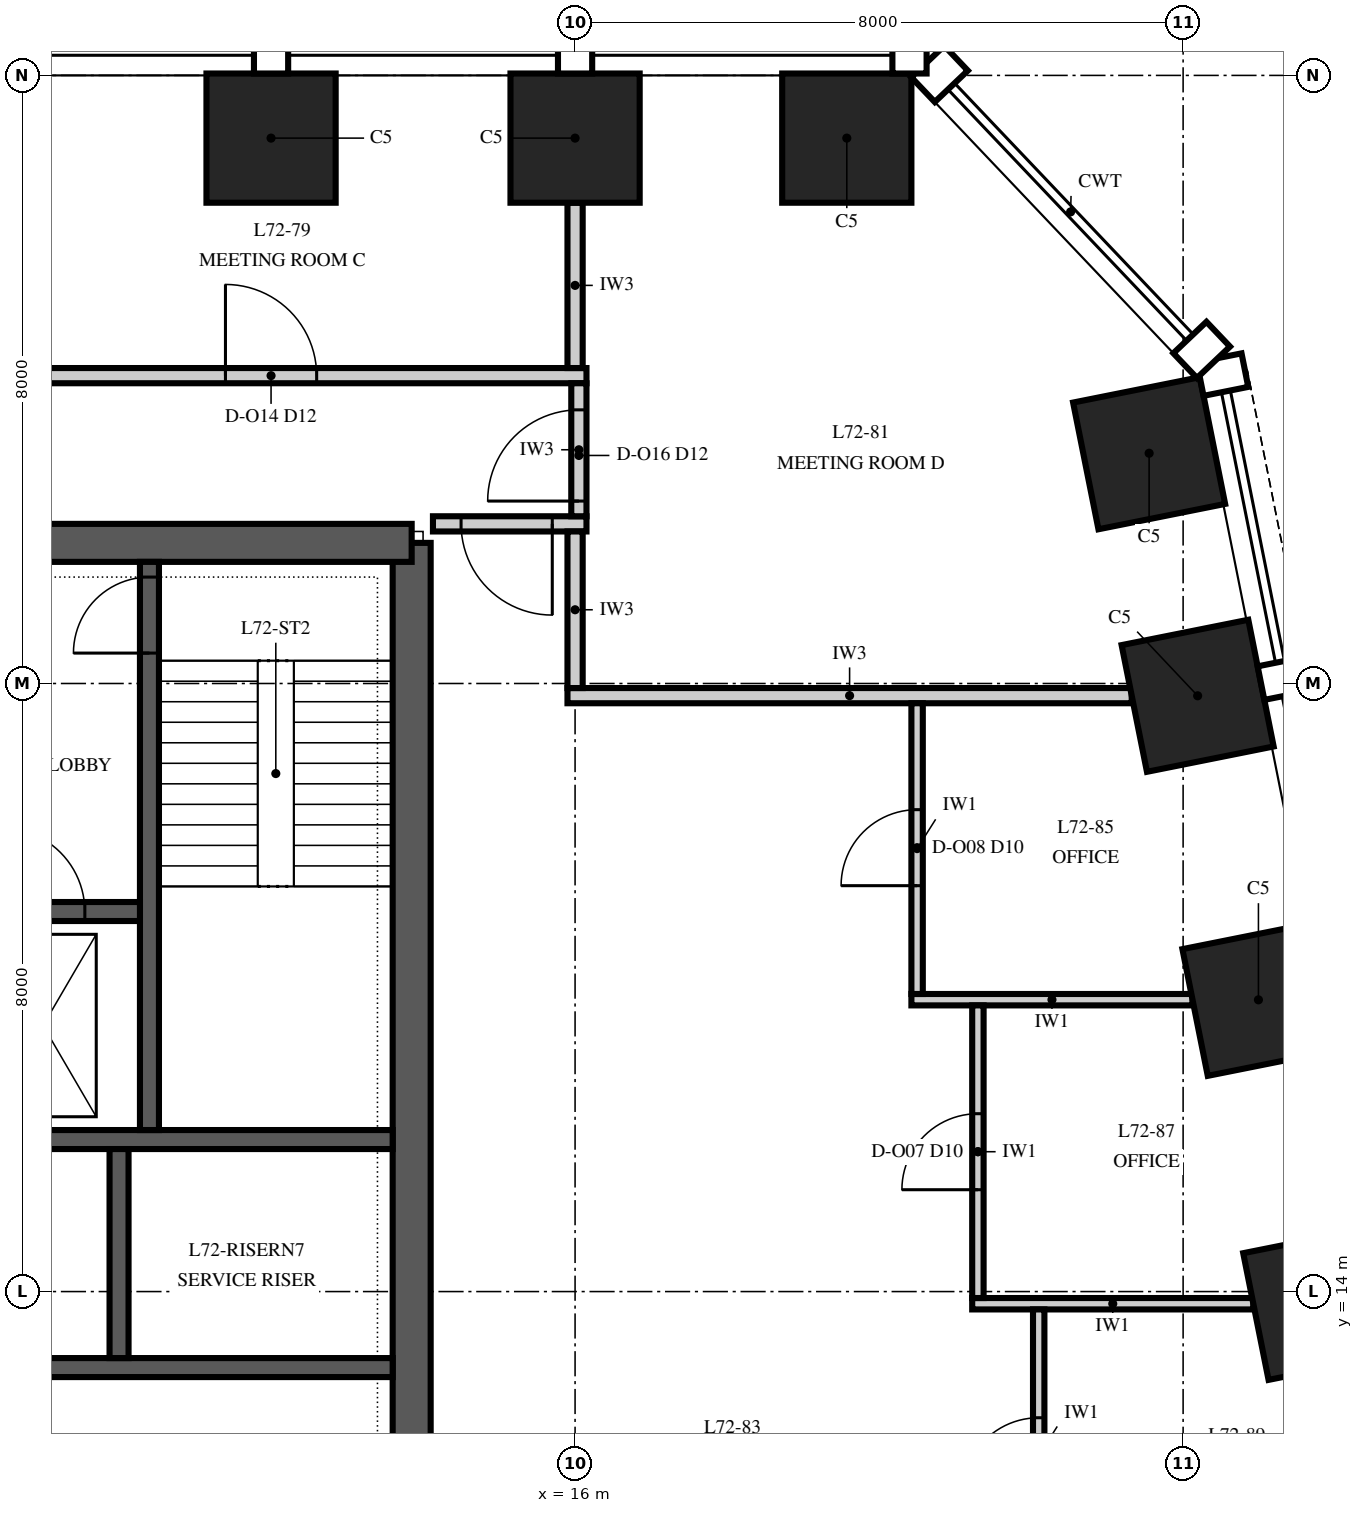
"""IFC4 building model, lengths in metres.
Left out: names, types, materials, properties, quantities, classifications, styles, units other than length and angle.
Written with IfcOpenShell. Run it as: python <this file> out.ifc"""

import sys

from ifc_helpers import new_model, si_unit, direction, frame, frame_2d, origin, origin_2d, place, context, subcontext, project, spatial, polyline, rectangle, outline, extrude, element, fill, save


model = new_model("IFC4")
c1 = context("Model", 3, precision=1e-05, world=origin(), true_north=direction((0.0, 1.0)))
c2 = subcontext(c1, "Body", "Model", "MODEL_VIEW")
j1 = project(units=[si_unit("LENGTHUNIT", "METRE"), si_unit("PLANEANGLEUNIT", "RADIAN")], contexts=[c1])
p1 = place(None, origin())
s1 = spatial("IfcSite", under=j1, at=p1, CompositionType="ELEMENT")
p2 = place(p1, origin())
s2 = spatial("IfcBuilding", under=s1, at=p2, CompositionType="ELEMENT")
p3 = place(p2, frame((0.0, 0.0, 308.0)))
s3 = spatial("IfcBuildingStorey", under=s2, at=p3, CompositionType="ELEMENT", Elevation=308.0)
for number, where, z_axis, x_axis in (
    (1, (25.791, 13.838, 0.0), (0.0, 0.0, 1.0), (-0.196, 0.981, 0.0)),
    (2, (24.991, 17.838, 0.0), (0.0, 0.0, 1.0), (-0.196, 0.981, 0.0)),
    (3, (24.191, 21.838, 0.0), (0.0, 0.0, 1.0), (-0.196, 0.981, 0.0)),
    (4, (23.553, 25.029, 0.0), (0.0, 0.0, 1.0), (-0.196, 0.981, 0.0)),
    (5, (19.575, 29.175, 0.0), (0.0, 0.0, 1.0), (-1.0, 0.0, 0.0)),
    (6, (16.0, 29.175, 0.0), (0.0, 0.0, 1.0), (-1.0, 0.0, 0.0)),
    (7, (12.0, 29.175, 0.0), (0.0, 0.0, 1.0), (-1.0, 0.0, 0.0)),
):
    element("IfcColumn", number, at=place(p3, frame(where, z_axis=z_axis, x_axis=x_axis)), inside=s3, PredefinedType="COLUMN", context=c2, shape_type="SweptSolid", body=[
        extrude(rectangle(XDim=1.7, YDim=1.7, at=origin_2d()), origin(), (0.0, 0.0, 1.0), 4.0),
    ])
p4 = place(p3, frame((13.85, 6.15, 0.0), z_axis=(0.0, 0.0, 1.0), x_axis=(0.0, 1.0, 0.0)))
e8 = element("IfcWall", 8, at=p4, inside=s3, PredefinedType="SHEAR", context=c2, shape_type="SweptSolid", body=[
    extrude(outline(polyline([(0.0, -0.25), (17.7, -0.25), (17.7, 0.0), (17.45, 0.0), (17.45, 0.25), (0.25, 0.25), (0.25, 0.0), (0.0, 0.0), (0.0, -0.25)])), origin(), (0.0, 0.0, 1.0), 4.0),
])
p5 = place(p4, frame((4.15, 0.0, 0.0)))
e9 = element("IfcOpeningElement", 9, at=p5, cuts=e8, PredefinedType="OPENING", context=c2, shape_type="SweptSolid", body=[
    extrude(rectangle(XDim=1.8, YDim=2.4, at=frame_2d((0.9, 1.2))), frame((0.0, 0.265, 0.0), z_axis=(0.0, -1.0, 0.0), x_axis=(1.0, 0.0, 0.0)), (0.0, 0.0, 1.0), 0.53),
])
p6 = place(p3, frame((13.85, 23.85, 0.0), z_axis=(0.0, 0.0, 1.0), x_axis=(-1.0, 0.0, 0.0)))
e10 = element("IfcWall", 10, at=p6, inside=s3, PredefinedType="SHEAR", context=c2, shape_type="SweptSolid", body=[
    extrude(rectangle(XDim=27.7, YDim=0.5, at=frame_2d((13.85, 0.0))), origin(), (0.0, 0.0, 1.0), 4.0),
])
p7 = place(p6, frame((21.75, 0.0, 0.0)))
e11 = element("IfcOpeningElement", 11, at=p7, cuts=e10, PredefinedType="OPENING", context=c2, shape_type="SweptSolid", body=[
    extrude(rectangle(XDim=1.0, YDim=2.1, at=frame_2d((0.5, 1.05))), frame((0.0, 0.265, 0.0), z_axis=(0.0, -1.0, 0.0), x_axis=(1.0, 0.0, 0.0)), (0.0, 0.0, 1.0), 0.53),
])
p8 = place(p6, frame((4.95, 0.0, 0.0)))
e12 = element("IfcOpeningElement", 12, at=p8, cuts=e10, PredefinedType="OPENING", context=c2, shape_type="SweptSolid", body=[
    extrude(rectangle(XDim=1.0, YDim=2.1, at=frame_2d((0.5, 1.05))), frame((0.0, 0.265, 0.0), z_axis=(0.0, -1.0, 0.0), x_axis=(1.0, 0.0, 0.0)), (0.0, 0.0, 1.0), 0.53),
])
p9 = place(p6, frame((17.35, 0.0, 0.0)))
e13 = element("IfcOpeningElement", 13, at=p9, cuts=e10, PredefinedType="OPENING", context=c2, shape_type="SweptSolid", body=[
    extrude(rectangle(XDim=1.0, YDim=2.1, at=frame_2d((0.5, 1.05))), frame((0.0, 0.265, 0.0), z_axis=(0.0, -1.0, 0.0), x_axis=(1.0, 0.0, 0.0)), (0.0, 0.0, 1.0), 0.53),
])
p10 = place(p6, frame((13.35, 0.0, 0.0)))
e14 = element("IfcOpeningElement", 14, at=p10, cuts=e10, PredefinedType="OPENING", context=c2, shape_type="SweptSolid", body=[
    extrude(rectangle(XDim=1.0, YDim=2.1, at=frame_2d((0.5, 1.05))), frame((0.0, 0.265, 0.0), z_axis=(0.0, -1.0, 0.0), x_axis=(1.0, 0.0, 0.0)), (0.0, 0.0, 1.0), 0.53),
])
p11 = place(p6, frame((9.35, 0.0, 0.0)))
e15 = element("IfcOpeningElement", 15, at=p11, cuts=e10, PredefinedType="OPENING", context=c2, shape_type="SweptSolid", body=[
    extrude(rectangle(XDim=1.0, YDim=2.1, at=frame_2d((0.5, 1.05))), frame((0.0, 0.265, 0.0), z_axis=(0.0, -1.0, 0.0), x_axis=(1.0, 0.0, 0.0)), (0.0, 0.0, 1.0), 0.53),
])
p12 = place(p3, frame((-13.6, 13.0, 0.0), z_axis=(0.0, 0.0, 1.0), x_axis=(1.0, 0.0, 0.0)))
e16 = element("IfcWall", 16, at=p12, inside=s3, PredefinedType="SHEAR", context=c2, shape_type="SweptSolid", body=[
    extrude(rectangle(XDim=27.2, YDim=0.25, at=frame_2d((13.6, 0.0))), origin(), (0.0, 0.0, 1.0), 4.0),
])
p13 = place(p12, frame((15.15, 0.0, 0.0)))
e17 = element("IfcOpeningElement", 17, at=p13, cuts=e16, PredefinedType="OPENING", context=c2, shape_type="SweptSolid", body=[
    extrude(rectangle(XDim=0.9, YDim=2.1, at=frame_2d((0.45, 1.05))), frame((0.0, 0.14, 0.0), z_axis=(0.0, -1.0, 0.0), x_axis=(1.0, 0.0, 0.0)), (0.0, 0.0, 1.0), 0.28),
])
p14 = place(p12, frame((17.55, 0.0, 0.0)))
e18 = element("IfcOpeningElement", 18, at=p14, cuts=e16, PredefinedType="OPENING", context=c2, shape_type="SweptSolid", body=[
    extrude(rectangle(XDim=0.9, YDim=2.1, at=frame_2d((0.45, 1.05))), frame((0.0, 0.14, 0.0), z_axis=(0.0, -1.0, 0.0), x_axis=(1.0, 0.0, 0.0)), (0.0, 0.0, 1.0), 0.28),
])
p15 = place(p12, frame((21.15, 0.0, 0.0)))
e19 = element("IfcOpeningElement", 19, at=p15, cuts=e16, PredefinedType="OPENING", context=c2, shape_type="SweptSolid", body=[
    extrude(rectangle(XDim=0.9, YDim=2.1, at=frame_2d((0.45, 1.05))), frame((0.0, 0.14, 0.0), z_axis=(0.0, -1.0, 0.0), x_axis=(1.0, 0.0, 0.0)), (0.0, 0.0, 1.0), 0.28),
])
p16 = place(p12, frame((0.55, 0.0, 0.0)))
e20 = element("IfcOpeningElement", 20, at=p16, cuts=e16, PredefinedType="OPENING", context=c2, shape_type="SweptSolid", body=[
    extrude(rectangle(XDim=0.9, YDim=2.1, at=frame_2d((0.45, 1.05))), frame((0.0, 0.14, 0.0), z_axis=(0.0, -1.0, 0.0), x_axis=(1.0, 0.0, 0.0)), (0.0, 0.0, 1.0), 0.28),
])
p17 = place(p12, frame((3.35, 0.0, 0.0)))
e21 = element("IfcOpeningElement", 21, at=p17, cuts=e16, PredefinedType="OPENING", context=c2, shape_type="SweptSolid", body=[
    extrude(rectangle(XDim=0.9, YDim=2.1, at=frame_2d((0.45, 1.05))), frame((0.0, 0.14, 0.0), z_axis=(0.0, -1.0, 0.0), x_axis=(1.0, 0.0, 0.0)), (0.0, 0.0, 1.0), 0.28),
])
p18 = place(p12, frame((6.15, 0.0, 0.0)))
e22 = element("IfcOpeningElement", 22, at=p18, cuts=e16, PredefinedType="OPENING", context=c2, shape_type="SweptSolid", body=[
    extrude(rectangle(XDim=0.9, YDim=2.1, at=frame_2d((0.45, 1.05))), frame((0.0, 0.14, 0.0), z_axis=(0.0, -1.0, 0.0), x_axis=(1.0, 0.0, 0.0)), (0.0, 0.0, 1.0), 0.28),
])
p19 = place(p3, frame((-13.6, 16.0, 0.0), z_axis=(0.0, 0.0, 1.0), x_axis=(1.0, 0.0, 0.0)))
e23 = element("IfcWall", 23, at=p19, inside=s3, PredefinedType="SHEAR", context=c2, shape_type="SweptSolid", body=[
    extrude(rectangle(XDim=27.2, YDim=0.25, at=frame_2d((13.6, 0.0))), origin(), (0.0, 0.0, 1.0), 4.0),
])
p20 = place(p3, frame((10.0, 13.125, 0.0), z_axis=(0.0, 0.0, 1.0), x_axis=(0.0, 1.0, 0.0)))
e24 = element("IfcWall", 24, at=p20, inside=s3, PredefinedType="SHEAR", context=c2, shape_type="SweptSolid", body=[
    extrude(rectangle(XDim=2.75, YDim=0.25, at=frame_2d((1.375, 0.0))), origin(), (0.0, 0.0, 1.0), 4.0),
])
p21 = place(p3, frame((10.4, 16.125, 0.0), z_axis=(0.0, 0.0, 1.0), x_axis=(0.0, 1.0, 0.0)))
e25 = element("IfcWall", 25, at=p21, inside=s3, PredefinedType="SHEAR", context=c2, shape_type="SweptSolid", body=[
    extrude(rectangle(XDim=7.475, YDim=0.25, at=frame_2d((3.738, 0.0))), origin(), (0.0, 0.0, 1.0), 4.0),
])
p22 = place(p21, frame((6.275, 0.0, 0.0)))
e26 = element("IfcOpeningElement", 26, at=p22, cuts=e25, PredefinedType="OPENING", context=c2, shape_type="SweptSolid", body=[
    extrude(rectangle(XDim=1.0, YDim=2.1, at=frame_2d((0.5, 1.05))), frame((0.0, 0.14, 0.0), z_axis=(0.0, -1.0, 0.0), x_axis=(1.0, 0.0, 0.0)), (0.0, 0.0, 1.0), 0.28),
])
p23 = place(p3, frame((6.525, 19.0, 0.0), z_axis=(0.0, 0.0, 1.0), x_axis=(1.0, 0.0, 0.0)))
e27 = element("IfcWall", 27, at=p23, inside=s3, PredefinedType="SHEAR", context=c2, shape_type="SweptSolid", body=[
    extrude(rectangle(XDim=3.75, YDim=0.25, at=frame_2d((1.875, 0.0))), origin(), (0.0, 0.0, 1.0), 4.0),
])
p24 = place(p23, frame((1.925, 0.0, 0.0)))
e28 = element("IfcOpeningElement", 28, at=p24, cuts=e27, PredefinedType="OPENING", context=c2, shape_type="SweptSolid", body=[
    extrude(rectangle(XDim=1.1, YDim=2.1, at=frame_2d((0.55, 1.05))), frame((0.0, 0.14, 0.0), z_axis=(0.0, -1.0, 0.0), x_axis=(1.0, 0.0, 0.0)), (0.0, 0.0, 1.0), 0.28),
])
for number, where, z_axis, x_axis in (
    (29, (21.225, 13.84, 0.0), (0.0, 0.0, 1.0), (1.0, 0.0, 0.0)),
    (30, (20.425, 17.84, 0.0), (0.0, 0.0, 1.0), (1.0, 0.0, 0.0)),
):
    element("IfcWall", number, at=place(p3, frame(where, z_axis=z_axis, x_axis=x_axis)), inside=s3, PredefinedType="PARTITIONING", context=c2, shape_type="SweptSolid", body=[
        extrude(rectangle(XDim=3.699, YDim=0.15, at=frame_2d((1.849, 0.0))), origin(), (0.0, 0.0, 1.0), 3.23),
    ])
p25 = place(p3, frame((15.9, 21.84, 0.0), z_axis=(0.0, 0.0, 1.0), x_axis=(1.0, 0.0, 0.0)))
e31 = element("IfcWall", 31, at=p25, inside=s3, PredefinedType="PARTITIONING", context=c2, shape_type="SweptSolid", body=[
    extrude(rectangle(XDim=7.424, YDim=0.2, at=frame_2d((3.712, 0.0))), origin(), (0.0, 0.0, 1.0), 3.23),
])
p26 = place(p3, frame((14.13, 24.1, 0.0), z_axis=(0.0, 0.0, 1.0), x_axis=(1.0, 0.0, 0.0)))
e32 = element("IfcWall", 32, at=p26, inside=s3, PredefinedType="PARTITIONING", context=c2, shape_type="SweptSolid", body=[
    extrude(rectangle(XDim=2.02, YDim=0.2, at=frame_2d((1.01, 0.0))), origin(), (0.0, 0.0, 1.0), 3.418),
])
p27 = place(p26, frame((0.37, 0.0, 0.0)))
e33 = element("IfcOpeningElement", 33, at=p27, cuts=e32, PredefinedType="OPENING", context=c2, shape_type="SweptSolid", body=[
    extrude(rectangle(XDim=1.2, YDim=2.4, at=frame_2d((0.6, 1.2))), frame((0.0, 0.115, 0.0), z_axis=(0.0, -1.0, 0.0), x_axis=(1.0, 0.0, 0.0)), (0.0, 0.0, 1.0), 0.23),
])
p28 = place(p3, frame((-16.15, 26.05, 0.0), z_axis=(0.0, 0.0, 1.0), x_axis=(1.0, 0.0, 0.0)))
e34 = element("IfcWall", 34, at=p28, inside=s3, PredefinedType="PARTITIONING", context=c2, shape_type="SweptSolid", body=[
    extrude(rectangle(XDim=32.3, YDim=0.2, at=frame_2d((16.15, 0.0))), origin(), (0.0, 0.0, 1.0), 3.418),
])
p29 = place(p28, frame((1.55, 0.0, 0.0)))
e35 = element("IfcOpeningElement", 35, at=p29, cuts=e34, PredefinedType="OPENING", context=c2, shape_type="SweptSolid", body=[
    extrude(rectangle(XDim=1.2, YDim=2.4, at=frame_2d((0.6, 1.2))), frame((0.0, 0.115, 0.0), z_axis=(0.0, -1.0, 0.0), x_axis=(1.0, 0.0, 0.0)), (0.0, 0.0, 1.0), 0.23),
])
p30 = place(p28, frame((5.55, 0.0, 0.0)))
e36 = element("IfcOpeningElement", 36, at=p30, cuts=e34, PredefinedType="OPENING", context=c2, shape_type="SweptSolid", body=[
    extrude(rectangle(XDim=1.2, YDim=2.4, at=frame_2d((0.6, 1.2))), frame((0.0, 0.115, 0.0), z_axis=(0.0, -1.0, 0.0), x_axis=(1.0, 0.0, 0.0)), (0.0, 0.0, 1.0), 0.23),
])
p31 = place(p28, frame((11.55, 0.0, 0.0)))
e37 = element("IfcOpeningElement", 37, at=p31, cuts=e34, PredefinedType="OPENING", context=c2, shape_type="SweptSolid", body=[
    extrude(rectangle(XDim=1.2, YDim=2.4, at=frame_2d((0.6, 1.2))), frame((0.0, 0.115, 0.0), z_axis=(0.0, -1.0, 0.0), x_axis=(1.0, 0.0, 0.0)), (0.0, 0.0, 1.0), 0.23),
])
p32 = place(p28, frame((17.55, 0.0, 0.0)))
e38 = element("IfcOpeningElement", 38, at=p32, cuts=e34, PredefinedType="OPENING", context=c2, shape_type="SweptSolid", body=[
    extrude(rectangle(XDim=1.2, YDim=2.4, at=frame_2d((0.6, 1.2))), frame((0.0, 0.115, 0.0), z_axis=(0.0, -1.0, 0.0), x_axis=(1.0, 0.0, 0.0)), (0.0, 0.0, 1.0), 0.23),
])
p33 = place(p28, frame((21.55, 0.0, 0.0)))
e39 = element("IfcOpeningElement", 39, at=p33, cuts=e34, PredefinedType="OPENING", context=c2, shape_type="SweptSolid", body=[
    extrude(rectangle(XDim=1.2, YDim=2.4, at=frame_2d((0.6, 1.2))), frame((0.0, 0.115, 0.0), z_axis=(0.0, -1.0, 0.0), x_axis=(1.0, 0.0, 0.0)), (0.0, 0.0, 1.0), 0.23),
])
p34 = place(p28, frame((27.55, 0.0, 0.0)))
e40 = element("IfcOpeningElement", 40, at=p34, cuts=e34, PredefinedType="OPENING", context=c2, shape_type="SweptSolid", body=[
    extrude(rectangle(XDim=1.2, YDim=2.4, at=frame_2d((0.6, 1.2))), frame((0.0, 0.115, 0.0), z_axis=(0.0, -1.0, 0.0), x_axis=(1.0, 0.0, 0.0)), (0.0, 0.0, 1.0), 0.23),
])
p35 = place(p3, frame((16.0, 21.94, 0.0), z_axis=(0.0, 0.0, 1.0), x_axis=(0.0, 1.0, 0.0)))
e41 = element("IfcWall", 41, at=p35, inside=s3, PredefinedType="PARTITIONING", context=c2, shape_type="SweptSolid", body=[
    extrude(rectangle(XDim=2.06, YDim=0.2, at=frame_2d((1.03, 0.0))), origin(), (0.0, 0.0, 1.0), 3.418),
])
p36 = place(p3, frame((16.0, 26.15, 0.0), z_axis=(0.0, 0.0, 1.0), x_axis=(0.0, 1.0, 0.0)))
e42 = element("IfcWall", 42, at=p36, inside=s3, PredefinedType="PARTITIONING", context=c2, shape_type="SweptSolid", body=[
    extrude(rectangle(XDim=2.175, YDim=0.2, at=frame_2d((1.087, 0.0))), origin(), (0.0, 0.0, 1.0), 3.418),
])
p37 = place(p3, frame((16.05, 24.2, 0.0), z_axis=(0.0, 0.0, 1.0), x_axis=(0.0, 1.0, 0.0)))
e43 = element("IfcWall", 43, at=p37, inside=s3, PredefinedType="PARTITIONING", context=c2, shape_type="SweptSolid", body=[
    extrude(rectangle(XDim=1.75, YDim=0.2, at=frame_2d((0.875, 0.0))), origin(), (0.0, 0.0, 1.0), 3.326),
])
p38 = place(p37, frame((0.2, 0.0, 0.0)))
e44 = element("IfcOpeningElement", 44, at=p38, cuts=e43, PredefinedType="OPENING", context=c2, shape_type="SweptSolid", body=[
    extrude(rectangle(XDim=1.2, YDim=2.4, at=frame_2d((0.6, 1.2))), frame((0.0, 0.115, 0.0), z_axis=(0.0, -1.0, 0.0), x_axis=(1.0, 0.0, 0.0)), (0.0, 0.0, 1.0), 0.23),
])
p39 = place(p3, frame((20.5, 17.915, 0.0), z_axis=(0.0, 0.0, 1.0), x_axis=(0.0, 1.0, 0.0)))
e45 = element("IfcWall", 45, at=p39, inside=s3, PredefinedType="PARTITIONING", context=c2, shape_type="SweptSolid", body=[
    extrude(rectangle(XDim=3.825, YDim=0.15, at=frame_2d((1.913, 0.0))), origin(), (0.0, 0.0, 1.0), 3.23),
])
p40 = place(p39, frame((1.425, 0.0, 0.0)))
e46 = element("IfcOpeningElement", 46, at=p40, cuts=e45, PredefinedType="OPENING", context=c2, shape_type="SweptSolid", body=[
    extrude(rectangle(XDim=1.0, YDim=2.3, at=frame_2d((0.5, 1.15))), frame((0.0, 0.09, 0.0), z_axis=(0.0, -1.0, 0.0), x_axis=(1.0, 0.0, 0.0)), (0.0, 0.0, 1.0), 0.18),
])
p41 = place(p3, frame((21.3, 13.915, 0.0), z_axis=(0.0, 0.0, 1.0), x_axis=(0.0, 1.0, 0.0)))
e47 = element("IfcWall", 47, at=p41, inside=s3, PredefinedType="PARTITIONING", context=c2, shape_type="SweptSolid", body=[
    extrude(rectangle(XDim=3.85, YDim=0.15, at=frame_2d((1.925, 0.0))), origin(), (0.0, 0.0, 1.0), 3.23),
])
p42 = place(p41, frame((1.425, 0.0, 0.0)))
e48 = element("IfcOpeningElement", 48, at=p42, cuts=e47, PredefinedType="OPENING", context=c2, shape_type="SweptSolid", body=[
    extrude(rectangle(XDim=1.0, YDim=2.3, at=frame_2d((0.5, 1.15))), frame((0.0, 0.09, 0.0), z_axis=(0.0, -1.0, 0.0), x_axis=(1.0, 0.0, 0.0)), (0.0, 0.0, 1.0), 0.18),
])
p43 = place(p3, frame((22.1, 9.915, 0.0), z_axis=(0.0, 0.0, 1.0), x_axis=(0.0, 1.0, 0.0)))
e49 = element("IfcWall", 49, at=p43, inside=s3, PredefinedType="PARTITIONING", context=c2, shape_type="SweptSolid", body=[
    extrude(rectangle(XDim=3.85, YDim=0.15, at=frame_2d((1.925, 0.0))), origin(), (0.0, 0.0, 1.0), 3.85),
])
p44 = place(p43, frame((1.425, 0.0, 0.0)))
e50 = element("IfcOpeningElement", 50, at=p44, cuts=e49, PredefinedType="OPENING", context=c2, shape_type="SweptSolid", body=[
    extrude(rectangle(XDim=1.0, YDim=2.3, at=frame_2d((0.5, 1.15))), frame((0.0, 0.09, 0.0), z_axis=(0.0, -1.0, 0.0), x_axis=(1.0, 0.0, 0.0)), (0.0, 0.0, 1.0), 0.18),
])
p45 = place(p22, origin())
e51 = element("IfcDoor", 51, at=p45, inside=s3, OperationType="SINGLE_SWING_LEFT", PredefinedType="DOOR", context=c2, shape_type="SweptSolid", body=[
    extrude(rectangle(XDim=1.0, YDim=2.1, at=frame_2d((0.5, 1.05))), frame((0.0, 0.125, 0.0), z_axis=(0.0, -1.0, 0.0), x_axis=(1.0, 0.0, 0.0)), (0.0, 0.0, 1.0), 0.25),
])
fill(e26, e51)
p46 = place(p24, origin())
e52 = element("IfcDoor", 52, at=p46, inside=s3, OperationType="SLIDING_TO_RIGHT", PredefinedType="DOOR", context=c2, shape_type="SweptSolid", body=[
    extrude(rectangle(XDim=1.1, YDim=2.1, at=frame_2d((0.55, 1.05))), frame((0.0, 0.125, 0.0), z_axis=(0.0, -1.0, 0.0), x_axis=(1.0, 0.0, 0.0)), (0.0, 0.0, 1.0), 0.25),
])
fill(e28, e52)
p47 = place(p44, origin())
e53 = element("IfcDoor", 53, at=p47, inside=s3, OperationType="SINGLE_SWING_LEFT", PredefinedType="DOOR", context=c2, shape_type="SweptSolid", body=[
    extrude(rectangle(XDim=1.0, YDim=2.3, at=frame_2d((0.5, 1.15))), frame((0.0, 0.075, 0.0), z_axis=(0.0, -1.0, 0.0), x_axis=(1.0, 0.0, 0.0)), (0.0, 0.0, 1.0), 0.149),
])
fill(e50, e53)
p48 = place(p42, origin())
e54 = element("IfcDoor", 54, at=p48, inside=s3, OperationType="SINGLE_SWING_LEFT", PredefinedType="DOOR", context=c2, shape_type="SweptSolid", body=[
    extrude(rectangle(XDim=1.0, YDim=2.3, at=frame_2d((0.5, 1.15))), frame((0.0, 0.075, 0.0), z_axis=(0.0, -1.0, 0.0), x_axis=(1.0, 0.0, 0.0)), (0.0, 0.0, 1.0), 0.149),
])
fill(e48, e54)
p49 = place(p40, origin())
e55 = element("IfcDoor", 55, at=p49, inside=s3, OperationType="SINGLE_SWING_LEFT", PredefinedType="DOOR", context=c2, shape_type="SweptSolid", body=[
    extrude(rectangle(XDim=1.0, YDim=2.3, at=frame_2d((0.5, 1.15))), frame((0.0, 0.075, 0.0), z_axis=(0.0, -1.0, 0.0), x_axis=(1.0, 0.0, 0.0)), (0.0, 0.0, 1.0), 0.149),
])
fill(e46, e55)
p50 = place(p34, origin())
e56 = element("IfcDoor", 56, at=p50, inside=s3, OperationType="SINGLE_SWING_LEFT", PredefinedType="DOOR", context=c2, shape_type="SweptSolid", body=[
    extrude(rectangle(XDim=1.2, YDim=2.4, at=frame_2d((0.6, 1.2))), frame((0.0, 0.1, 0.0), z_axis=(0.0, -1.0, 0.0), x_axis=(1.0, 0.0, 0.0)), (0.0, 0.0, 1.0), 0.199),
])
fill(e40, e56)
p51 = place(p38, origin())
e57 = element("IfcDoor", 57, at=p51, inside=s3, OperationType="SINGLE_SWING_LEFT", PredefinedType="DOOR", context=c2, shape_type="SweptSolid", body=[
    extrude(rectangle(XDim=1.2, YDim=2.4, at=frame_2d((0.6, 1.2))), frame((0.0, 0.1, 0.0), z_axis=(0.0, -1.0, 0.0), x_axis=(1.0, 0.0, 0.0)), (0.0, 0.0, 1.0), 0.199),
])
fill(e44, e57)
p52 = place(p27, frame((1.2, 0.0, 0.0), z_axis=(0.0, 0.0, 1.0), x_axis=(-1.0, 0.0, 0.0)))
e58 = element("IfcDoor", 58, at=p52, inside=s3, OperationType="SINGLE_SWING_LEFT", PredefinedType="DOOR", context=c2, shape_type="SweptSolid", body=[
    extrude(rectangle(XDim=1.2, YDim=2.4, at=frame_2d((0.6, 1.2))), frame((0.0, 0.1, 0.0), z_axis=(0.0, -1.0, 0.0), x_axis=(1.0, 0.0, 0.0)), (0.0, 0.0, 1.0), 0.199),
])
fill(e33, e58)
save(model, sys.argv[1])
